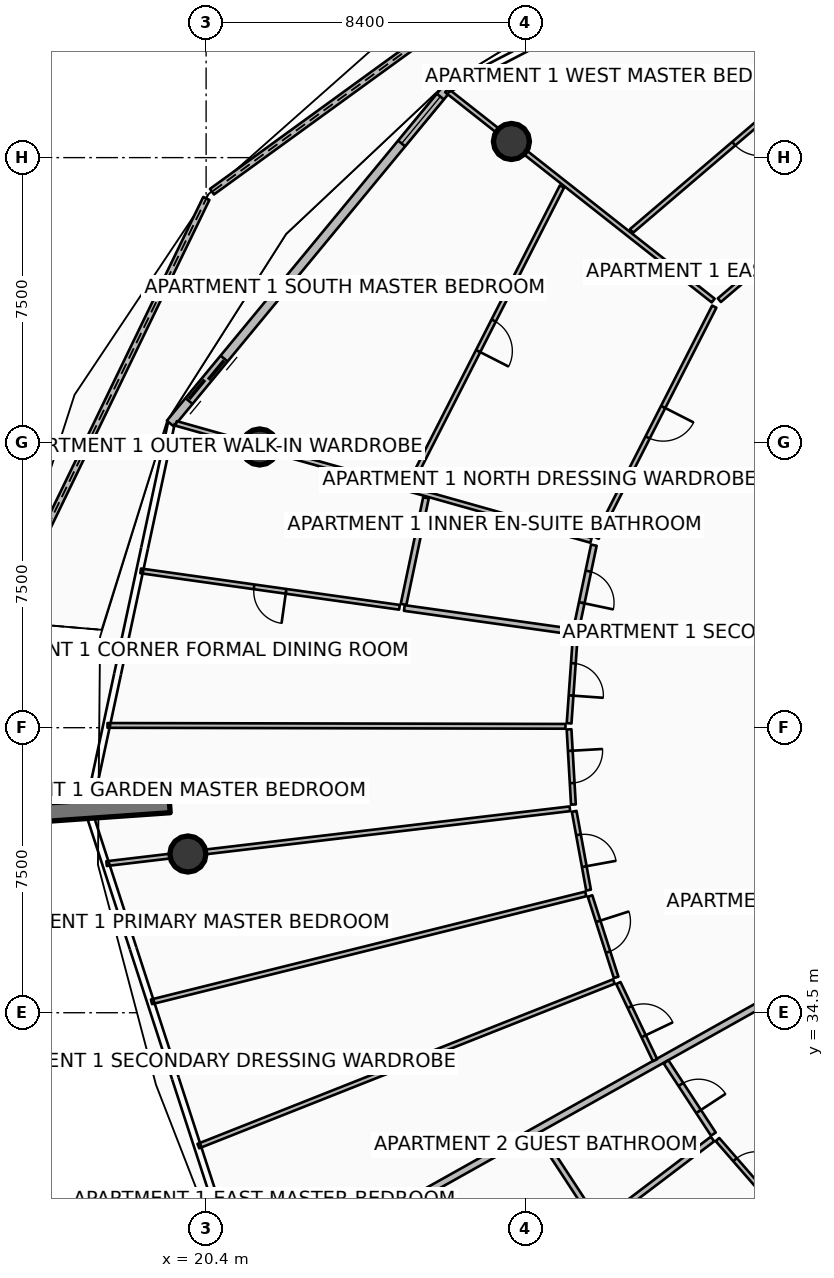
"""IFC4 building model, lengths in metres.
Left out: names, types, materials, properties, quantities, classifications, styles, units other than length and angle.
Written with IfcOpenShell. Run it as: python <this file> out.ifc"""

import sys

from ifc_helpers import new_model, si_unit, direction, frame, frame_2d, origin, origin_2d, place, context, subcontext, project, spatial, polyline, rectangle, circle, outline, extrude, element, fill, save


model = new_model("IFC4")
c1 = context("Model", 3, precision=1e-05, world=origin(), true_north=direction((0.0, 1.0)))
c2 = subcontext(c1, "Body", "Model", "MODEL_VIEW")
j1 = project(units=[si_unit("LENGTHUNIT", "METRE"), si_unit("PLANEANGLEUNIT", "RADIAN")], contexts=[c1])
p1 = place(None, origin())
s1 = spatial("IfcSite", under=j1, at=p1, CompositionType="ELEMENT")
p2 = place(p1, origin())
s2 = spatial("IfcBuilding", under=s1, at=p2, CompositionType="ELEMENT")
p3 = place(p2, frame((0.0, 0.0, 259.8)))
s3 = spatial("IfcBuildingStorey", under=s2, at=p3, CompositionType="ELEMENT", Elevation=259.8)
p4 = place(p3, frame((19.438, 40.003, 0.0), z_axis=(0.0, 0.0, 1.0), x_axis=(-0.997563824095, -0.069759707979, 0.0)))
e1 = element("IfcWall", 1, at=p4, inside=s3, PredefinedType="SOLIDWALL", context=c2, shape_type="SweptSolid", body=[
    extrude(rectangle(XDim=3.5, YDim=0.48, at=frame_2d((1.75, 0.0))), origin(), (0.0, 0.0, 1.0), 3.85),
])
for number, where, z_axis, x_axis in (
    (2, (28.434, 57.425, 0.0), (0.0, 0.0, 1.0), (1.0, 0.0, 0.0)),
    (3, (21.809, 49.387, 0.0), (0.0, 0.0, 1.0), (1.0, 0.0, 0.0)),
    (4, (19.92, 38.677, 0.0), (0.0, 0.0, 1.0), (1.0, 0.0, 0.0)),
):
    element("IfcColumn", number, at=place(p3, frame(where, z_axis=z_axis, x_axis=x_axis)), inside=s3, PredefinedType="COLUMN", context=c2, shape_type="SweptSolid", body=[
        extrude(circle(Radius=0.475, at=origin_2d()), origin(), (0.0, 0.0, 1.0), 3.59),
    ])
p5 = place(p3, frame((29.924, 62.905, 0.0), z_axis=(0.0, 0.0, 1.0), x_axis=(-0.809261043527, -0.587449200722, 0.0)))
e5 = element("IfcWall", 5, at=p5, inside=s3, PredefinedType="PARAPET", context=c2, shape_type="SweptSolid", body=[
    extrude(outline(polyline([(0.0, 0.0), (11.577, 0.0), (11.577, 1.632), (5.788, 1.418), (0.0, 1.233), (0.0, 0.0)])), frame((0.0, 0.09, 0.0), z_axis=(0.0, -1.0, 0.0), x_axis=(1.0, 0.0, 0.0)), (0.0, 0.0, 1.0), 0.18),
])
p6 = place(p3, frame((20.406, 55.925, 0.0), z_axis=(0.0, 0.0, 1.0), x_axis=(-0.435762237374, -0.900061815921, 0.0)))
e6 = element("IfcWall", 6, at=p6, inside=s3, PredefinedType="PARAPET", context=c2, shape_type="SweptSolid", body=[
    extrude(outline(polyline([(0.0, 0.0), (12.362, 0.0), (12.362, 1.86), (6.181, 1.798), (0.0, 1.632), (0.0, 0.0)])), frame((0.0, 0.09, 0.0), z_axis=(0.0, -1.0, 0.0), x_axis=(1.0, 0.0, 0.0)), (0.0, 0.0, 1.0), 0.18),
])
p7 = place(p3, frame((26.742, 58.822, 0.0), z_axis=(0.0, 0.0, 1.0), x_axis=(-0.636680093065, -0.771128043255, 0.0)))
e7 = element("IfcWall", 7, at=p7, inside=s3, PredefinedType="SOLIDWALL", context=c2, shape_type="SweptSolid", body=[
    extrude(rectangle(XDim=11.438, YDim=0.24, at=frame_2d((5.719, 0.0))), origin(), (0.0, 0.0, 1.0), 2.54),
])
p8 = place(p7, frame((9.218, 0.0, 0.0)))
e8 = element("IfcOpeningElement", 8, at=p8, cuts=e7, PredefinedType="OPENING", context=c2, shape_type="SweptSolid", body=[
    extrude(rectangle(XDim=1.45, YDim=2.15, at=frame_2d((0.725, 1.075))), frame((0.0, 0.13, 0.0), z_axis=(0.0, -1.0, 0.0), x_axis=(1.0, 0.0, 0.0)), (0.0, 0.0, 1.0), 0.26),
])
p9 = place(p7, frame((0.28, 0.0, 0.65)))
e9 = element("IfcOpeningElement", 9, at=p9, cuts=e7, PredefinedType="OPENING", context=c2, shape_type="SweptSolid", body=[
    extrude(rectangle(XDim=1.6, YDim=1.5, at=frame_2d((0.8, 0.75))), frame((0.0, 0.13, 0.0), z_axis=(0.0, -1.0, 0.0), x_axis=(1.0, 0.0, 0.0)), (0.0, 0.0, 1.0), 0.26),
])
p10 = place(p3, frame((37.054, 35.87, 0.0), z_axis=(0.0, 0.0, 1.0), x_axis=(-0.872490186067, -0.488631635506, 0.0)))
e10 = element("IfcWall", 10, at=p10, inside=s3, PredefinedType="PARTITIONING", context=c2, shape_type="SweptSolid", body=[
    extrude(rectangle(XDim=17.884, YDim=0.18, at=frame_2d((8.942, 0.0))), origin(), (0.0, 0.0, 1.0), 2.957),
])
p11 = place(p3, frame((39.095, 57.681, 0.0), z_axis=(0.0, 0.0, 1.0), x_axis=(-0.760396866349, -0.649458702033, 0.0)))
e11 = element("IfcWall", 11, at=p11, inside=s3, PredefinedType="PARTITIONING", context=c2, shape_type="SweptSolid", body=[
    extrude(rectangle(XDim=6.824, YDim=0.125, at=frame_2d((3.412, 0.0))), origin(), (0.0, 0.0, 1.0), 2.957),
])
p12 = place(p11, frame((2.962, 0.0, 0.0)))
e12 = element("IfcOpeningElement", 12, at=p12, cuts=e11, PredefinedType="OPENING", context=c2, shape_type="SweptSolid", body=[
    extrude(rectangle(XDim=0.9, YDim=2.08, at=frame_2d((0.45, 1.04))), frame((0.0, 0.073, 0.0), z_axis=(0.0, -1.0, 0.0), x_axis=(1.0, 0.0, 0.0)), (0.0, 0.0, 1.0), 0.145),
])
p13 = place(p3, frame((37.657, 60.248, 0.0), z_axis=(0.0, 0.0, 1.0), x_axis=(-0.76041400447, -0.649438635905, 0.0)))
e13 = element("IfcWall", 13, at=p13, inside=s3, PredefinedType="PARTITIONING", context=c2, shape_type="SweptSolid", body=[
    extrude(rectangle(XDim=7.973, YDim=0.125, at=frame_2d((3.986, 0.0))), origin(), (0.0, 0.0, 1.0), 2.957),
])
p14 = place(p13, frame((3.536, 0.0, 0.0)))
e14 = element("IfcOpeningElement", 14, at=p14, cuts=e13, PredefinedType="OPENING", context=c2, shape_type="SweptSolid", body=[
    extrude(rectangle(XDim=0.9, YDim=2.08, at=frame_2d((0.45, 1.04))), frame((0.0, 0.073, 0.0), z_axis=(0.0, -1.0, 0.0), x_axis=(1.0, 0.0, 0.0)), (0.0, 0.0, 1.0), 0.145),
])
p15 = place(p3, frame((33.743, 53.239, 0.0), z_axis=(0.0, 0.0, 1.0), x_axis=(-0.785324118062, 0.619084832305, 0.0)))
e15 = element("IfcWall", 15, at=p15, inside=s3, PredefinedType="PARTITIONING", context=c2, shape_type="SweptSolid", body=[
    extrude(rectangle(XDim=8.931, YDim=0.125, at=frame_2d((4.465, 0.0))), origin(), (0.0, 0.0, 1.0), 2.957),
])
p16 = place(p3, frame((33.772, 53.079, 0.0), z_axis=(0.0, 0.0, 1.0), x_axis=(-0.454012060349, -0.890995538181, 0.0)))
e16 = element("IfcWall", 16, at=p16, inside=s3, PredefinedType="PARTITIONING", context=c2, shape_type="SweptSolid", body=[
    extrude(rectangle(XDim=6.824, YDim=0.125, at=frame_2d((3.412, 0.0))), origin(), (0.0, 0.0, 1.0), 2.957),
])
p17 = place(p16, frame((2.962, 0.0, 0.0)))
e17 = element("IfcOpeningElement", 17, at=p17, cuts=e16, PredefinedType="OPENING", context=c2, shape_type="SweptSolid", body=[
    extrude(rectangle(XDim=0.9, YDim=2.08, at=frame_2d((0.45, 1.04))), frame((0.0, 0.073, 0.0), z_axis=(0.0, -1.0, 0.0), x_axis=(1.0, 0.0, 0.0)), (0.0, 0.0, 1.0), 0.145),
])
p18 = place(p3, frame((29.764, 56.239, 0.0), z_axis=(0.0, 0.0, 1.0), x_axis=(-0.453980126594, -0.891011809494, 0.0)))
e18 = element("IfcWall", 18, at=p18, inside=s3, PredefinedType="PARTITIONING", context=c2, shape_type="SweptSolid", body=[
    extrude(rectangle(XDim=8.816, YDim=0.125, at=frame_2d((4.408, 0.0))), origin(), (0.0, 0.0, 1.0), 2.957),
])
p19 = place(p18, frame((3.958, 0.0, 0.0)))
e19 = element("IfcOpeningElement", 19, at=p19, cuts=e18, PredefinedType="OPENING", context=c2, shape_type="SweptSolid", body=[
    extrude(rectangle(XDim=0.9, YDim=2.08, at=frame_2d((0.45, 1.04))), frame((0.0, 0.073, 0.0), z_axis=(0.0, -1.0, 0.0), x_axis=(1.0, 0.0, 0.0)), (0.0, 0.0, 1.0), 0.145),
])
p20 = place(p3, frame((30.528, 46.928, 0.0), z_axis=(0.0, 0.0, 1.0), x_axis=(-0.962454146261, 0.271444315367, 0.0)))
e20 = element("IfcWall", 20, at=p20, inside=s3, PredefinedType="PARTITIONING", context=c2, shape_type="SweptSolid", body=[
    extrude(rectangle(XDim=11.342, YDim=0.125, at=frame_2d((5.671, 0.0))), origin(), (0.0, 0.0, 1.0), 2.957),
])
p21 = place(p3, frame((30.603, 46.803, 0.0), z_axis=(0.0, 0.0, 1.0), x_axis=(-0.205906433606, -0.978571683935, 0.0)))
e21 = element("IfcWall", 21, at=p21, inside=s3, PredefinedType="PARTITIONING", context=c2, shape_type="SweptSolid", body=[
    extrude(rectangle(XDim=2.247, YDim=0.15, at=frame_2d((1.124, 0.0))), origin(), (0.0, 0.0, 1.0), 2.957),
])
p22 = place(p21, frame((0.698, 0.0, 0.0)))
e22 = element("IfcOpeningElement", 22, at=p22, cuts=e21, PredefinedType="OPENING", context=c2, shape_type="SweptSolid", body=[
    extrude(rectangle(XDim=0.85, YDim=2.06, at=frame_2d((0.425, 1.03))), frame((0.0, 0.085, 0.0), z_axis=(0.0, -1.0, 0.0), x_axis=(1.0, 0.0, 0.0)), (0.0, 0.0, 1.0), 0.17),
])
p23 = place(p3, frame((26.186, 48.049, 0.0), z_axis=(0.0, 0.0, 1.0), x_axis=(-0.205851663269, -0.97858320685, 0.0)))
e23 = element("IfcWall", 23, at=p23, inside=s3, PredefinedType="PARTITIONING", context=c2, shape_type="SweptSolid", body=[
    extrude(rectangle(XDim=2.866, YDim=0.15, at=frame_2d((1.433, 0.0))), origin(), (0.0, 0.0, 1.0), 2.957),
])
p24 = place(p3, frame((30.033, 44.528, 0.0), z_axis=(0.0, 0.0, 1.0), x_axis=(-0.990248320871, 0.139313542101, 0.0)))
e24 = element("IfcWall", 24, at=p24, inside=s3, PredefinedType="PARTITIONING", context=c2, shape_type="SweptSolid", body=[
    extrude(rectangle(XDim=4.46, YDim=0.15, at=frame_2d((2.23, 0.0))), origin(), (0.0, 0.0, 1.0), 3.03),
])
p25 = place(p3, frame((25.488, 45.168, 0.0), z_axis=(0.0, 0.0, 1.0), x_axis=(-0.990239896804, 0.139373407717, 0.0)))
e25 = element("IfcWall", 25, at=p25, inside=s3, PredefinedType="PARTITIONING", context=c2, shape_type="SweptSolid", body=[
    extrude(rectangle(XDim=6.877, YDim=0.125, at=frame_2d((3.438, 0.0))), origin(), (0.0, 0.0, 1.0), 3.03),
])
p26 = place(p25, frame((3.014, 0.0, 0.0)))
e26 = element("IfcOpeningElement", 26, at=p26, cuts=e25, PredefinedType="OPENING", context=c2, shape_type="SweptSolid", body=[
    extrude(rectangle(XDim=0.85, YDim=2.06, at=frame_2d((0.425, 1.03))), frame((0.0, 0.073, 0.0), z_axis=(0.0, -1.0, 0.0), x_axis=(1.0, 0.0, 0.0)), (0.0, 0.0, 1.0), 0.145),
])
p27 = place(p3, frame((29.856, 42.036, 0.0), z_axis=(0.0, 0.0, 1.0), x_axis=(-0.999998028993, 0.001985449601, 0.0)))
e27 = element("IfcWall", 27, at=p27, inside=s3, PredefinedType="PARTITIONING", context=c2, shape_type="SweptSolid", body=[
    extrude(rectangle(XDim=12.051, YDim=0.125, at=frame_2d((6.025, 0.0))), origin(), (0.0, 0.0, 1.0), 3.03),
])
p28 = place(p3, frame((30.116, 44.426, 0.0), z_axis=(0.0, 0.0, 1.0), x_axis=(-0.07082759095, -0.997488572546, 0.0)))
e28 = element("IfcWall", 28, at=p28, inside=s3, PredefinedType="PARTITIONING", context=c2, shape_type="SweptSolid", body=[
    extrude(rectangle(XDim=2.316, YDim=0.125, at=frame_2d((1.158, 0.0))), origin(), (0.0, 0.0, 1.0), 3.03),
])
p29 = place(p28, frame((0.733, 0.0, 0.0)))
e29 = element("IfcOpeningElement", 29, at=p29, cuts=e28, PredefinedType="OPENING", context=c2, shape_type="SweptSolid", body=[
    extrude(rectangle(XDim=0.85, YDim=2.06, at=frame_2d((0.425, 1.03))), frame((0.0, 0.073, 0.0), z_axis=(0.0, -1.0, 0.0), x_axis=(1.0, 0.0, 0.0)), (0.0, 0.0, 1.0), 0.145),
])
p30 = place(p3, frame((29.951, 41.956, 0.0), z_axis=(0.0, 0.0, 1.0), x_axis=(0.057790197943, -0.998328749973, 0.0)))
e30 = element("IfcWall", 30, at=p30, inside=s3, PredefinedType="PARTITIONING", context=c2, shape_type="SweptSolid", body=[
    extrude(rectangle(XDim=1.981, YDim=0.125, at=frame_2d((0.991, 0.0))), origin(), (0.0, 0.0, 1.0), 2.957),
])
p31 = place(p30, frame((0.566, 0.0, 0.0)))
e31 = element("IfcOpeningElement", 31, at=p31, cuts=e30, PredefinedType="OPENING", context=c2, shape_type="SweptSolid", body=[
    extrude(rectangle(XDim=0.85, YDim=2.06, at=frame_2d((0.425, 1.03))), frame((0.0, 0.073, 0.0), z_axis=(0.0, -1.0, 0.0), x_axis=(1.0, 0.0, 0.0)), (0.0, 0.0, 1.0), 0.145),
])
p32 = place(p3, frame((29.972, 39.866, 0.0), z_axis=(0.0, 0.0, 1.0), x_axis=(-0.993068089356, -0.117540503246, 0.0)))
e32 = element("IfcWall", 32, at=p32, inside=s3, PredefinedType="PARTITIONING", context=c2, shape_type="SweptSolid", body=[
    extrude(rectangle(XDim=12.276, YDim=0.125, at=frame_2d((6.138, 0.0))), origin(), (0.0, 0.0, 1.0), 2.957),
])
p33 = place(p3, frame((30.391, 37.626, 0.0), z_axis=(0.0, 0.0, 1.0), x_axis=(-0.970503640625, -0.24108646485, 0.0)))
e33 = element("IfcWall", 33, at=p33, inside=s3, PredefinedType="PARTITIONING", context=c2, shape_type="SweptSolid", body=[
    extrude(rectangle(XDim=11.775, YDim=0.125, at=frame_2d((5.888, 0.0))), origin(), (0.0, 0.0, 1.0), 3.03),
])
p34 = place(p3, frame((31.13, 35.321, 0.0), z_axis=(0.0, 0.0, 1.0), x_axis=(-0.929773898428, -0.368131087796, 0.0)))
e34 = element("IfcWall", 34, at=p34, inside=s3, PredefinedType="PARTITIONING", context=c2, shape_type="SweptSolid", body=[
    extrude(rectangle(XDim=11.76, YDim=0.125, at=frame_2d((5.88, 0.0))), origin(), (0.0, 0.0, 1.0), 3.03),
])
p35 = place(p3, frame((30.085, 39.799, 0.0), z_axis=(0.0, 0.0, 1.0), x_axis=(0.179690800857, -0.983723139957, 0.0)))
e35 = element("IfcWall", 35, at=p35, inside=s3, PredefinedType="PARTITIONING", context=c2, shape_type="SweptSolid", body=[
    extrude(rectangle(XDim=2.107, YDim=0.125, at=frame_2d((1.054, 0.0))), origin(), (0.0, 0.0, 1.0), 2.957),
])
p36 = place(p35, frame((0.629, 0.0, 0.0)))
e36 = element("IfcOpeningElement", 36, at=p36, cuts=e35, PredefinedType="OPENING", context=c2, shape_type="SweptSolid", body=[
    extrude(rectangle(XDim=0.85, YDim=2.06, at=frame_2d((0.425, 1.03))), frame((0.0, 0.073, 0.0), z_axis=(0.0, -1.0, 0.0), x_axis=(1.0, 0.0, 0.0)), (0.0, 0.0, 1.0), 0.145),
])
p37 = place(p3, frame((30.503, 37.571, 0.0), z_axis=(0.0, 0.0, 1.0), x_axis=(0.305327243998, -0.952247485727, 0.0)))
e37 = element("IfcWall", 37, at=p37, inside=s3, PredefinedType="PARTITIONING", context=c2, shape_type="SweptSolid", body=[
    extrude(rectangle(XDim=2.249, YDim=0.125, at=frame_2d((1.124, 0.0))), origin(), (0.0, 0.0, 1.0), 3.03),
])
p38 = place(p37, frame((0.699, 0.0, 0.0)))
e38 = element("IfcOpeningElement", 38, at=p38, cuts=e37, PredefinedType="OPENING", context=c2, shape_type="SweptSolid", body=[
    extrude(rectangle(XDim=0.85, YDim=2.06, at=frame_2d((0.425, 1.03))), frame((0.0, 0.073, 0.0), z_axis=(0.0, -1.0, 0.0), x_axis=(1.0, 0.0, 0.0)), (0.0, 0.0, 1.0), 0.145),
])
p39 = place(p3, frame((31.248, 35.281, 0.0), z_axis=(0.0, 0.0, 1.0), x_axis=(0.429406696771, -0.903111227241, 0.0)))
e39 = element("IfcWall", 39, at=p39, inside=s3, PredefinedType="PARTITIONING", context=c2, shape_type="SweptSolid", body=[
    extrude(rectangle(XDim=2.249, YDim=0.125, at=frame_2d((1.124, 0.0))), origin(), (0.0, 0.0, 1.0), 2.957),
])
p40 = place(p39, frame((0.699, 0.0, 0.0)))
e40 = element("IfcOpeningElement", 40, at=p40, cuts=e39, PredefinedType="OPENING", context=c2, shape_type="SweptSolid", body=[
    extrude(rectangle(XDim=0.85, YDim=2.06, at=frame_2d((0.425, 1.03))), frame((0.0, 0.073, 0.0), z_axis=(0.0, -1.0, 0.0), x_axis=(1.0, 0.0, 0.0)), (0.0, 0.0, 1.0), 0.145),
])
p41 = place(p3, frame((32.503, 33.207, 0.0), z_axis=(0.0, 0.0, 1.0), x_axis=(0.54776176335, -0.836634358972, 0.0)))
e41 = element("IfcWall", 41, at=p41, inside=s3, PredefinedType="PARTITIONING", context=c2, shape_type="SweptSolid", body=[
    extrude(rectangle(XDim=2.272, YDim=0.15, at=frame_2d((1.136, 0.0))), origin(), (0.0, 0.0, 1.0), 2.957),
])
p42 = place(p41, frame((0.711, 0.0, 0.0)))
e42 = element("IfcOpeningElement", 42, at=p42, cuts=e41, PredefinedType="OPENING", context=c2, shape_type="SweptSolid", body=[
    extrude(rectangle(XDim=0.85, YDim=2.06, at=frame_2d((0.425, 1.03))), frame((0.0, 0.085, 0.0), z_axis=(0.0, -1.0, 0.0), x_axis=(1.0, 0.0, 0.0)), (0.0, 0.0, 1.0), 0.17),
])
p43 = place(p3, frame((29.144, 31.326, 0.0), z_axis=(0.0, 0.0, 1.0), x_axis=(0.547727893033, -0.836656533587, 0.0)))
e43 = element("IfcWall", 43, at=p43, inside=s3, PredefinedType="PARTITIONING", context=c2, shape_type="SweptSolid", body=[
    extrude(rectangle(XDim=2.804, YDim=0.15, at=frame_2d((1.402, 0.0))), origin(), (0.0, 0.0, 1.0), 2.957),
])
p44 = place(p3, frame((33.725, 31.177, 0.0), z_axis=(0.0, 0.0, 1.0), x_axis=(-0.796854692537, -0.604171001441, 0.0)))
e44 = element("IfcWall", 44, at=p44, inside=s3, PredefinedType="PARTITIONING", context=c2, shape_type="SweptSolid", body=[
    extrude(rectangle(XDim=3.72, YDim=0.15, at=frame_2d((1.86, 0.0))), origin(), (0.0, 0.0, 1.0), 3.03),
])
p45 = place(p3, frame((33.856, 31.163, 0.0), z_axis=(0.0, 0.0, 1.0), x_axis=(0.656985315096, -0.753903372952, 0.0)))
e45 = element("IfcWall", 45, at=p45, inside=s3, PredefinedType="PARTITIONING", context=c2, shape_type="SweptSolid", body=[
    extrude(rectangle(XDim=2.255, YDim=0.125, at=frame_2d((1.127, 0.0))), origin(), (0.0, 0.0, 1.0), 3.03),
])
p46 = place(p45, frame((0.702, 0.0, 0.0)))
e46 = element("IfcOpeningElement", 46, at=p46, cuts=e45, PredefinedType="OPENING", context=c2, shape_type="SweptSolid", body=[
    extrude(rectangle(XDim=0.85, YDim=2.06, at=frame_2d((0.425, 1.03))), frame((0.0, 0.073, 0.0), z_axis=(0.0, -1.0, 0.0), x_axis=(1.0, 0.0, 0.0)), (0.0, 0.0, 1.0), 0.145),
])
p47 = place(p8, origin())
e47 = element("IfcDoor", 47, at=p47, inside=s3, OperationType="DOUBLE_DOOR_SLIDING", PredefinedType="DOOR", context=c2, shape_type="SweptSolid", body=[
    extrude(rectangle(XDim=1.45, YDim=2.15, at=frame_2d((0.725, 1.075))), frame((0.0, 0.025, 0.0), z_axis=(0.0, -1.0, 0.0), x_axis=(1.0, 0.0, 0.0)), (0.0, 0.0, 1.0), 0.05),
])
fill(e8, e47)
p48 = place(p9, origin())
e48 = element("IfcWindow", 48, at=p48, inside=s3, PartitioningType="SINGLE_PANEL", PredefinedType="WINDOW", context=c2, shape_type="SweptSolid", body=[
    extrude(rectangle(XDim=1.6, YDim=1.5, at=frame_2d((0.8, 0.75))), frame((0.0, 0.03, 0.0), z_axis=(0.0, -1.0, 0.0), x_axis=(1.0, 0.0, 0.0)), (0.0, 0.0, 1.0), 0.06),
])
fill(e9, e48)
p49 = place(p14, origin())
e49 = element("IfcDoor", 49, at=p49, inside=s3, OperationType="SINGLE_SWING_LEFT", PredefinedType="DOOR", context=c2, shape_type="SweptSolid", body=[
    extrude(rectangle(XDim=0.9, YDim=2.08, at=frame_2d((0.45, 1.04))), frame((0.0, 0.025, 0.0), z_axis=(0.0, -1.0, 0.0), x_axis=(1.0, 0.0, 0.0)), (0.0, 0.0, 1.0), 0.05),
])
fill(e14, e49)
p50 = place(p17, origin())
e50 = element("IfcDoor", 50, at=p50, inside=s3, OperationType="SINGLE_SWING_LEFT", PredefinedType="DOOR", context=c2, shape_type="SweptSolid", body=[
    extrude(rectangle(XDim=0.9, YDim=2.08, at=frame_2d((0.45, 1.04))), frame((0.0, 0.025, 0.0), z_axis=(0.0, -1.0, 0.0), x_axis=(1.0, 0.0, 0.0)), (0.0, 0.0, 1.0), 0.05),
])
fill(e17, e50)
p51 = place(p19, origin())
e51 = element("IfcDoor", 51, at=p51, inside=s3, OperationType="SINGLE_SWING_RIGHT", PredefinedType="DOOR", context=c2, shape_type="SweptSolid", body=[
    extrude(rectangle(XDim=0.9, YDim=2.08, at=frame_2d((0.45, 1.04))), frame((0.0, 0.025, 0.0), z_axis=(0.0, -1.0, 0.0), x_axis=(1.0, 0.0, 0.0)), (0.0, 0.0, 1.0), 0.05),
])
fill(e19, e51)
p52 = place(p22, origin())
e52 = element("IfcDoor", 52, at=p52, inside=s3, OperationType="SINGLE_SWING_RIGHT", PredefinedType="DOOR", context=c2, shape_type="SweptSolid", body=[
    extrude(rectangle(XDim=0.85, YDim=2.06, at=frame_2d((0.425, 1.03))), frame((0.0, 0.025, 0.0), z_axis=(0.0, -1.0, 0.0), x_axis=(1.0, 0.0, 0.0)), (0.0, 0.0, 1.0), 0.05),
])
fill(e22, e52)
p53 = place(p26, origin())
e53 = element("IfcDoor", 53, at=p53, inside=s3, OperationType="SINGLE_SWING_LEFT", PredefinedType="DOOR", context=c2, shape_type="SweptSolid", body=[
    extrude(rectangle(XDim=0.85, YDim=2.06, at=frame_2d((0.425, 1.03))), frame((0.0, 0.025, 0.0), z_axis=(0.0, -1.0, 0.0), x_axis=(1.0, 0.0, 0.0)), (0.0, 0.0, 1.0), 0.05),
])
fill(e26, e53)
p54 = place(p29, origin())
e54 = element("IfcDoor", 54, at=p54, inside=s3, OperationType="SINGLE_SWING_RIGHT", PredefinedType="DOOR", context=c2, shape_type="SweptSolid", body=[
    extrude(rectangle(XDim=0.85, YDim=2.06, at=frame_2d((0.425, 1.03))), frame((0.0, 0.025, 0.0), z_axis=(0.0, -1.0, 0.0), x_axis=(1.0, 0.0, 0.0)), (0.0, 0.0, 1.0), 0.05),
])
fill(e29, e54)
p55 = place(p31, origin())
e55 = element("IfcDoor", 55, at=p55, inside=s3, OperationType="SINGLE_SWING_LEFT", PredefinedType="DOOR", context=c2, shape_type="SweptSolid", body=[
    extrude(rectangle(XDim=0.85, YDim=2.06, at=frame_2d((0.425, 1.03))), frame((0.0, 0.025, 0.0), z_axis=(0.0, -1.0, 0.0), x_axis=(1.0, 0.0, 0.0)), (0.0, 0.0, 1.0), 0.05),
])
fill(e31, e55)
p56 = place(p36, origin())
e56 = element("IfcDoor", 56, at=p56, inside=s3, OperationType="SINGLE_SWING_RIGHT", PredefinedType="DOOR", context=c2, shape_type="SweptSolid", body=[
    extrude(rectangle(XDim=0.85, YDim=2.06, at=frame_2d((0.425, 1.03))), frame((0.0, 0.025, 0.0), z_axis=(0.0, -1.0, 0.0), x_axis=(1.0, 0.0, 0.0)), (0.0, 0.0, 1.0), 0.05),
])
fill(e36, e56)
p57 = place(p38, origin())
e57 = element("IfcDoor", 57, at=p57, inside=s3, OperationType="SINGLE_SWING_LEFT", PredefinedType="DOOR", context=c2, shape_type="SweptSolid", body=[
    extrude(rectangle(XDim=0.85, YDim=2.06, at=frame_2d((0.425, 1.03))), frame((0.0, 0.025, 0.0), z_axis=(0.0, -1.0, 0.0), x_axis=(1.0, 0.0, 0.0)), (0.0, 0.0, 1.0), 0.05),
])
fill(e38, e57)
p58 = place(p40, origin())
e58 = element("IfcDoor", 58, at=p58, inside=s3, OperationType="SINGLE_SWING_RIGHT", PredefinedType="DOOR", context=c2, shape_type="SweptSolid", body=[
    extrude(rectangle(XDim=0.85, YDim=2.06, at=frame_2d((0.425, 1.03))), frame((0.0, 0.025, 0.0), z_axis=(0.0, -1.0, 0.0), x_axis=(1.0, 0.0, 0.0)), (0.0, 0.0, 1.0), 0.05),
])
fill(e40, e58)
p59 = place(p42, origin())
e59 = element("IfcDoor", 59, at=p59, inside=s3, OperationType="SINGLE_SWING_RIGHT", PredefinedType="DOOR", context=c2, shape_type="SweptSolid", body=[
    extrude(rectangle(XDim=0.85, YDim=2.06, at=frame_2d((0.425, 1.03))), frame((0.0, 0.025, 0.0), z_axis=(0.0, -1.0, 0.0), x_axis=(1.0, 0.0, 0.0)), (0.0, 0.0, 1.0), 0.05),
])
fill(e42, e59)
p60 = place(p46, origin())
e60 = element("IfcDoor", 60, at=p60, inside=s3, OperationType="SINGLE_SWING_RIGHT", PredefinedType="DOOR", context=c2, shape_type="SweptSolid", body=[
    extrude(rectangle(XDim=0.85, YDim=2.06, at=frame_2d((0.425, 1.03))), frame((0.0, 0.025, 0.0), z_axis=(0.0, -1.0, 0.0), x_axis=(1.0, 0.0, 0.0)), (0.0, 0.0, 1.0), 0.05),
])
fill(e46, e60)
save(model, sys.argv[1])
